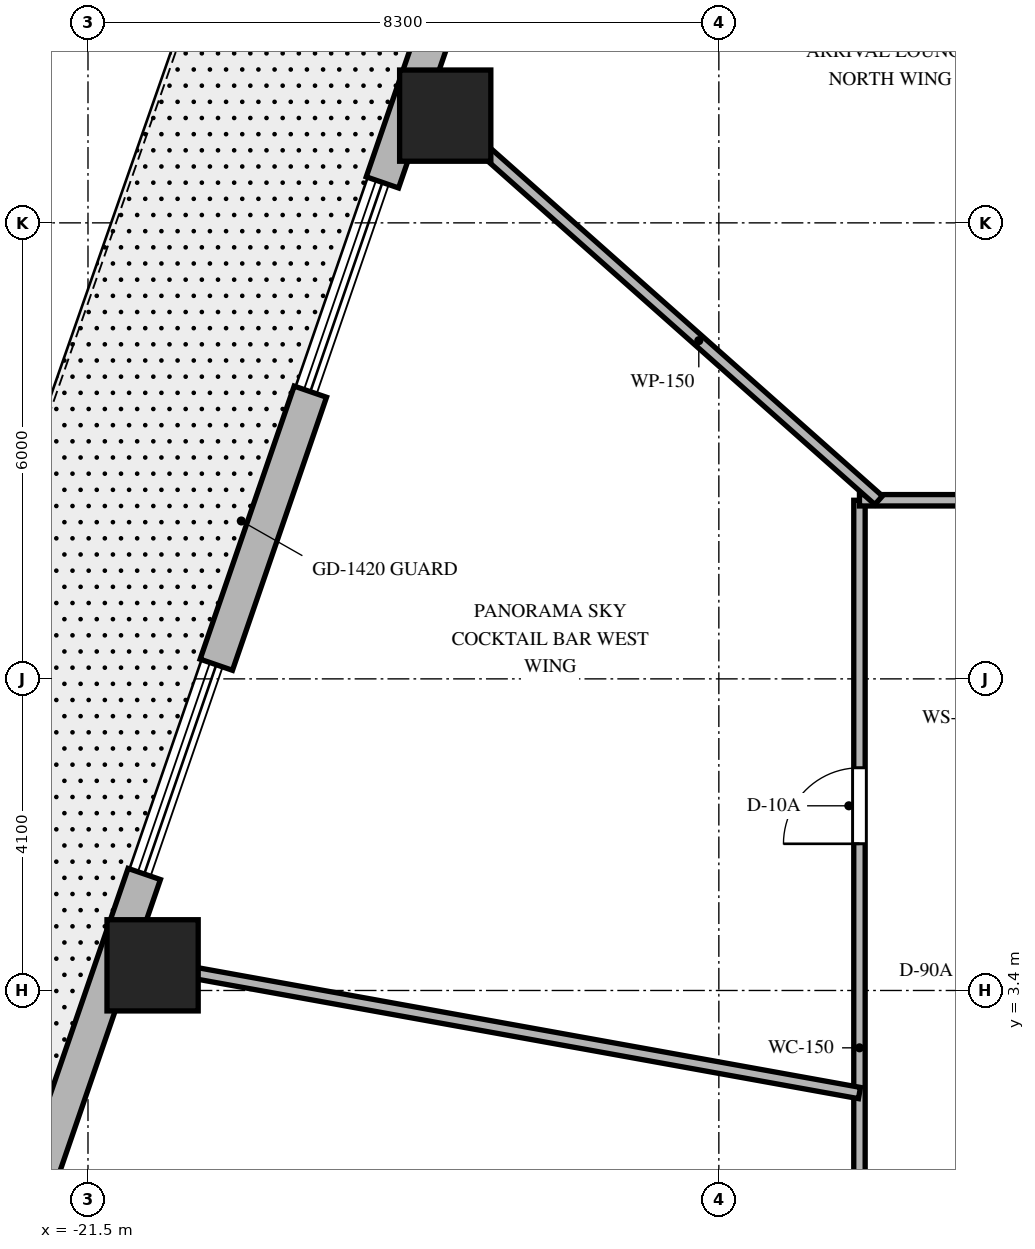
"""IFC4 building model, lengths in metres.
Left out: names, types, materials, properties, quantities, classifications, styles, units other than length and angle.
Written with IfcOpenShell. Run it as: python <this file> out.ifc"""

import sys

from ifc_helpers import new_model, si_unit, direction, frame, frame_2d, origin, origin_2d, place, context, subcontext, project, spatial, rectangle, extrude, element, fill, save


model = new_model("IFC4")
c1 = context("Model", 3, precision=1e-05, world=origin(), true_north=direction((0.0, 1.0)))
c2 = subcontext(c1, "Body", "Model", "MODEL_VIEW")
j1 = project(units=[si_unit("LENGTHUNIT", "METRE"), si_unit("PLANEANGLEUNIT", "RADIAN")], contexts=[c1])
p1 = place(None, origin())
s1 = spatial("IfcSite", under=j1, at=p1, CompositionType="ELEMENT")
p2 = place(p1, origin())
s2 = spatial("IfcBuilding", under=s1, at=p2, CompositionType="ELEMENT")
p3 = place(p2, frame((0.0, 0.0, 139.5)))
s3 = spatial("IfcBuildingStorey", under=s2, at=p3, CompositionType="ELEMENT", Elevation=139.5)
for number, where, z_axis, x_axis in (
    (1, (-16.8, 14.911, 0.0), (0.0, 0.0, 1.0), (1.0, 0.0, 0.0)),
    (2, (-20.65, 3.731, 0.0), (0.0, 0.0, 1.0), (1.0, 0.0, 0.0)),
):
    element("IfcColumn", number, at=place(p3, frame(where, z_axis=z_axis, x_axis=x_axis)), inside=s3, PredefinedType="COLUMN", context=c2, shape_type="SweptSolid", body=[
        extrude(rectangle(XDim=1.2, YDim=1.2, at=origin_2d()), origin(), (0.0, 0.0, 1.0), 4.8),
    ])
p4 = place(p3, frame((-15.992, 18.777, 0.0), z_axis=(0.0, 0.0, 1.0), x_axis=(-0.325626313688, -0.945498547769, 0.0)))
e3 = element("IfcWall", 3, at=p4, inside=s3, PredefinedType="SOLIDWALL", context=c2, shape_type="SweptSolid", body=[
    extrude(rectangle(XDim=5.018, YDim=0.45, at=frame_2d((2.509, 0.0))), origin(), (0.0, 0.0, 1.0), 4.5),
])
p5 = place(p4, frame((2.009, 0.0, 0.0)))
e4 = element("IfcOpeningElement", 4, at=p5, cuts=e3, PredefinedType="OPENING", context=c2, shape_type="SweptSolid", body=[
    extrude(rectangle(XDim=1.0, YDim=2.15, at=frame_2d((0.5, 1.075))), frame((0.0, 0.235, 0.0), z_axis=(0.0, -1.0, 0.0), x_axis=(1.0, 0.0, 0.0)), (0.0, 0.0, 1.0), 0.47),
])
p6 = place(p3, frame((-18.574, 11.279, 0.0), z_axis=(0.0, 0.0, 1.0), x_axis=(-0.325598625093, -0.945508083169, 0.0)))
e5 = element("IfcWall", 5, at=p6, inside=s3, PredefinedType="SOLIDWALL", context=c2, shape_type="SweptSolid", body=[
    extrude(rectangle(XDim=3.8, YDim=0.45, at=frame_2d((1.9, 0.0))), origin(), (0.0, 0.0, 1.0), 4.5),
])
p7 = place(p3, frame((-20.76, 4.933, 0.0), z_axis=(0.0, 0.0, 1.0), x_axis=(-0.325594073587, -0.94550965053, 0.0)))
e6 = element("IfcWall", 6, at=p7, inside=s3, PredefinedType="SOLIDWALL", context=c2, shape_type="SweptSolid", body=[
    extrude(rectangle(XDim=5.028, YDim=0.45, at=frame_2d((2.514, 0.0))), origin(), (0.0, 0.0, 1.0), 4.5),
])
p8 = place(p3, frame((-11.35, -9.85, 0.0), z_axis=(0.0, 0.0, 1.0), x_axis=(0.0, 1.0, 0.0)))
e7 = element("IfcWall", 7, at=p8, inside=s3, PredefinedType="PARTITIONING", context=c2, shape_type="SweptSolid", body=[
    extrude(rectangle(XDim=19.7, YDim=0.15, at=frame_2d((9.85, 0.0))), origin(), (0.0, 0.0, 1.0), 2.69),
])
p9 = place(p8, frame((15.18, 0.0, 0.0)))
e8 = element("IfcOpeningElement", 8, at=p9, cuts=e7, PredefinedType="OPENING", context=c2, shape_type="SweptSolid", body=[
    extrude(rectangle(XDim=1.0, YDim=2.03, at=frame_2d((0.5, 1.015))), frame((0.0, 0.085, 0.0), z_axis=(0.0, -1.0, 0.0), x_axis=(1.0, 0.0, 0.0)), (0.0, 0.0, 1.0), 0.17),
])
p10 = place(p8, frame((8.811, 0.0, 0.0)))
e9 = element("IfcOpeningElement", 9, at=p10, cuts=e7, PredefinedType="OPENING", context=c2, shape_type="SweptSolid", body=[
    extrude(rectangle(XDim=1.0, YDim=2.03, at=frame_2d((0.5, 1.015))), frame((0.0, 0.085, 0.0), z_axis=(0.0, -1.0, 0.0), x_axis=(1.0, 0.0, 0.0)), (0.0, 0.0, 1.0), 0.17),
])
p11 = place(p8, frame((2.983, 0.0, 0.0)))
e10 = element("IfcOpeningElement", 10, at=p11, cuts=e7, PredefinedType="OPENING", context=c2, shape_type="SweptSolid", body=[
    extrude(rectangle(XDim=1.0, YDim=2.03, at=frame_2d((0.5, 1.015))), frame((0.0, 0.085, 0.0), z_axis=(0.0, -1.0, 0.0), x_axis=(1.0, 0.0, 0.0)), (0.0, 0.0, 1.0), 0.17),
])
p12 = place(p3, frame((-11.35, 9.85, 0.0), z_axis=(0.0, 0.0, 1.0), x_axis=(1.0, 0.0, 0.0)))
e11 = element("IfcWall", 11, at=p12, inside=s3, PredefinedType="PARTITIONING", context=c2, shape_type="SweptSolid", body=[
    extrude(rectangle(XDim=22.7, YDim=0.15, at=frame_2d((11.35, 0.0))), origin(), (0.0, 0.0, 1.0), 2.69),
])
p13 = place(p12, frame((17.212, 0.0, 0.0)))
e12 = element("IfcOpeningElement", 12, at=p13, cuts=e11, PredefinedType="OPENING", context=c2, shape_type="SweptSolid", body=[
    extrude(rectangle(XDim=1.0, YDim=2.03, at=frame_2d((0.5, 1.015))), frame((0.0, 0.085, 0.0), z_axis=(0.0, -1.0, 0.0), x_axis=(1.0, 0.0, 0.0)), (0.0, 0.0, 1.0), 0.17),
])
p14 = place(p12, frame((10.425, 0.0, 0.0)))
e13 = element("IfcOpeningElement", 13, at=p14, cuts=e11, PredefinedType="OPENING", context=c2, shape_type="SweptSolid", body=[
    extrude(rectangle(XDim=1.0, YDim=2.03, at=frame_2d((0.5, 1.015))), frame((0.0, 0.085, 0.0), z_axis=(0.0, -1.0, 0.0), x_axis=(1.0, 0.0, 0.0)), (0.0, 0.0, 1.0), 0.17),
])
p15 = place(p12, frame((3.374, 0.0, 0.0)))
e14 = element("IfcOpeningElement", 14, at=p15, cuts=e11, PredefinedType="OPENING", context=c2, shape_type="SweptSolid", body=[
    extrude(rectangle(XDim=1.0, YDim=2.03, at=frame_2d((0.5, 1.015))), frame((0.0, 0.085, 0.0), z_axis=(0.0, -1.0, 0.0), x_axis=(1.0, 0.0, 0.0)), (0.0, 0.0, 1.0), 0.17),
])
p16 = place(p3, frame((-11.098, 9.85, 0.0), z_axis=(0.0, 0.0, 1.0), x_axis=(-0.747904295103, 0.663806572253, 0.0)))
e15 = element("IfcWall", 15, at=p16, inside=s3, PredefinedType="PARTITIONING", context=c2, shape_type="SweptSolid", body=[
    extrude(rectangle(XDim=8.16, YDim=0.15, at=frame_2d((4.08, 0.0))), origin(), (0.0, 0.0, 1.0), 2.69),
])
p17 = place(p3, frame((-11.35, 2.051, 0.0), z_axis=(0.0, 0.0, 1.0), x_axis=(-0.984068313063, 0.177790762484, 0.0)))
e16 = element("IfcWall", 16, at=p17, inside=s3, PredefinedType="PARTITIONING", context=c2, shape_type="SweptSolid", body=[
    extrude(rectangle(XDim=9.951, YDim=0.15, at=frame_2d((4.976, 0.0))), origin(), (0.0, 0.0, 1.0), 2.69),
])
p18 = place(p9, origin())
e17 = element("IfcDoor", 17, at=p18, inside=s3, OperationType="SINGLE_SWING_LEFT", PredefinedType="DOOR", context=c2, shape_type="SweptSolid", body=[
    extrude(rectangle(XDim=1.0, YDim=2.03, at=frame_2d((0.5, 1.015))), frame((0.0, 0.025, 0.0), z_axis=(0.0, -1.0, 0.0), x_axis=(1.0, 0.0, 0.0)), (0.0, 0.0, 1.0), 0.05),
])
fill(e8, e17)
save(model, sys.argv[1])
